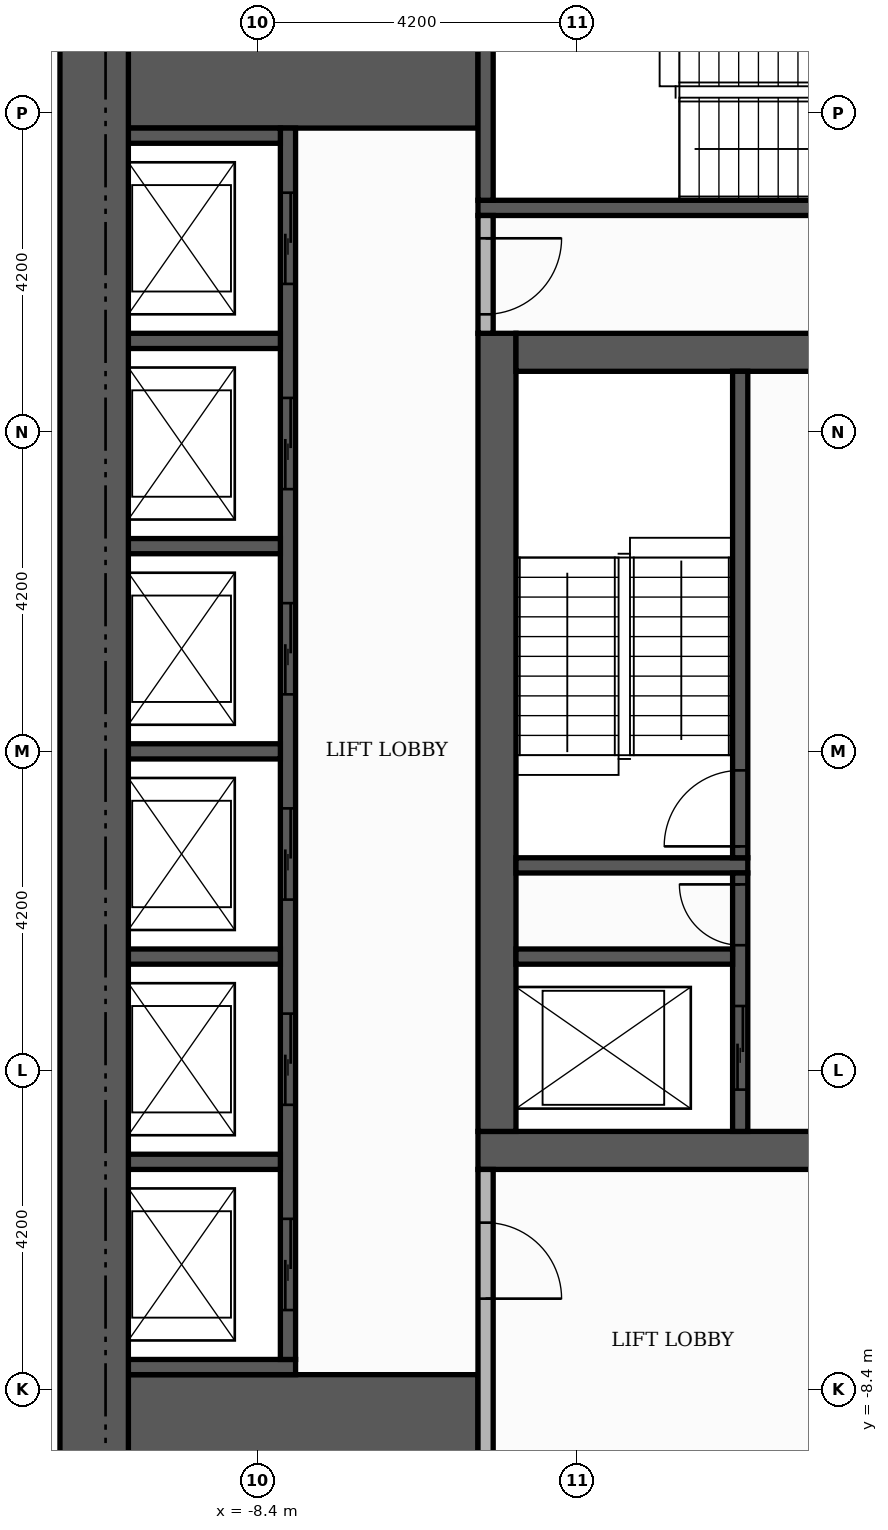
"""IFC4 building model, lengths in metres.
Left out: names, types, materials, properties, quantities, classifications, styles, units other than length and angle.
Written with IfcOpenShell. Run it as: python <this file> out.ifc"""

import sys

from ifc_helpers import new_model, si_unit, direction, frame, frame_2d, origin, place, context, subcontext, project, spatial, rectangle, extrude, element, fill, save


model = new_model("IFC4")
c1 = context("Model", 3, precision=1e-05, world=origin(), true_north=direction((0.0, 1.0)))
c2 = subcontext(c1, "Body", "Model", "MODEL_VIEW")
j1 = project(units=[si_unit("LENGTHUNIT", "METRE"), si_unit("PLANEANGLEUNIT", "RADIAN")], contexts=[c1])
p1 = place(None, origin())
s1 = spatial("IfcSite", under=j1, at=p1, CompositionType="ELEMENT")
p2 = place(p1, origin())
s2 = spatial("IfcBuilding", under=s1, at=p2, CompositionType="ELEMENT")
p3 = place(p2, frame((0.0, 0.0, 30.9)))
s3 = spatial("IfcBuildingStorey", under=s2, at=p3, CompositionType="ELEMENT", Elevation=30.9)
p4 = place(p3, frame((-5.5, -5.25, 0.0), z_axis=(0.0, 0.0, 1.0), x_axis=(1.0, 0.0, 0.0)))
e1 = element("IfcWall", 1, at=p4, inside=s3, PredefinedType="SHEAR", context=c2, shape_type="SweptSolid", body=[
    extrude(rectangle(XDim=11.0, YDim=0.5, at=frame_2d((5.5, 0.0))), origin(), (0.0, 0.0, 1.0), 3.48),
])
p5 = place(p4, frame((4.9, 0.0, 0.0)))
e2 = element("IfcOpeningElement", 2, at=p5, cuts=e1, PredefinedType="OPENING", context=c2, shape_type="SweptSolid", body=[
    extrude(rectangle(XDim=1.2, YDim=2.1, at=frame_2d((0.6, 1.05))), frame((0.0, 0.26, 0.0), z_axis=(0.0, -1.0, 0.0), x_axis=(1.0, 0.0, 0.0)), (0.0, 0.0, 1.0), 0.52),
])
p6 = place(p3, frame((-5.25, -5.0, 0.0), z_axis=(0.0, 0.0, 1.0), x_axis=(0.0, 1.0, 0.0)))
e3 = element("IfcWall", 3, at=p6, inside=s3, PredefinedType="SHEAR", context=c2, shape_type="SweptSolid", body=[
    extrude(rectangle(XDim=10.5, YDim=0.5, at=frame_2d((5.25, 0.0))), origin(), (0.0, 0.0, 1.0), 3.48),
])
p7 = place(p3, frame((-5.0, 5.25, 0.0), z_axis=(0.0, 0.0, 1.0), x_axis=(1.0, 0.0, 0.0)))
e4 = element("IfcWall", 4, at=p7, inside=s3, PredefinedType="SHEAR", context=c2, shape_type="SweptSolid", body=[
    extrude(rectangle(XDim=10.0, YDim=0.5, at=frame_2d((5.0, 0.0))), origin(), (0.0, 0.0, 1.0), 3.48),
])
p8 = place(p7, frame((4.4, 0.0, 0.0)))
e5 = element("IfcOpeningElement", 5, at=p8, cuts=e4, PredefinedType="OPENING", context=c2, shape_type="SweptSolid", body=[
    extrude(rectangle(XDim=1.2, YDim=2.1, at=frame_2d((0.6, 1.05))), frame((0.0, 0.26, 0.0), z_axis=(0.0, -1.0, 0.0), x_axis=(1.0, 0.0, 0.0)), (0.0, 0.0, 1.0), 0.52),
])
for number, where, z_axis, x_axis in (
    (6, (-10.1, -9.15, 0.0), (0.0, 0.0, 1.0), (1.0, 0.0, 0.0)),
    (7, (-10.1, 9.15, 0.0), (0.0, 0.0, 1.0), (1.0, 0.0, 0.0)),
):
    element("IfcWall", number, at=place(p3, frame(where, z_axis=z_axis, x_axis=x_axis)), inside=s3, PredefinedType="SHEAR", context=c2, shape_type="SweptSolid", body=[
        extrude(rectangle(XDim=4.6, YDim=1.9, at=frame_2d((2.3, 0.0))), origin(), (0.0, 0.0, 1.0), 3.48),
    ])
p9 = place(p3, frame((-5.0, -1.5, 0.0), z_axis=(0.0, 0.0, 1.0), x_axis=(1.0, 0.0, 0.0)))
e8 = element("IfcWall", 8, at=p9, inside=s3, PredefinedType="SHEAR", context=c2, shape_type="SweptSolid", body=[
    extrude(rectangle(XDim=3.05, YDim=0.2, at=frame_2d((1.525, 0.0))), origin(), (0.0, 0.0, 1.0), 3.48),
])
p10 = place(p3, frame((-2.05, -1.4, 0.0), z_axis=(0.0, 0.0, 1.0), x_axis=(0.0, 1.0, 0.0)))
e9 = element("IfcWall", 9, at=p10, inside=s3, PredefinedType="SHEAR", context=c2, shape_type="SweptSolid", body=[
    extrude(rectangle(XDim=6.4, YDim=0.2, at=frame_2d((3.2, 0.0))), origin(), (0.0, 0.0, 1.0), 3.48),
])
p11 = place(p10, frame((0.15, 0.0, 0.0)))
e10 = element("IfcOpeningElement", 10, at=p11, cuts=e9, PredefinedType="OPENING", context=c2, shape_type="SweptSolid", body=[
    extrude(rectangle(XDim=1.0, YDim=2.1, at=frame_2d((0.5, 1.05))), frame((0.0, 0.11, 0.0), z_axis=(0.0, -1.0, 0.0), x_axis=(1.0, 0.0, 0.0)), (0.0, 0.0, 1.0), 0.22),
])
p12 = place(p3, frame((-5.5, 7.15, 0.0), z_axis=(0.0, 0.0, 1.0), x_axis=(1.0, 0.0, 0.0)))
e11 = element("IfcWall", 11, at=p12, inside=s3, PredefinedType="SHEAR", context=c2, shape_type="SweptSolid", body=[
    extrude(rectangle(XDim=6.8, YDim=0.2, at=frame_2d((3.4, 0.0))), origin(), (0.0, 0.0, 1.0), 3.48),
])
p13 = place(p3, frame((-5.4, 7.25, 0.0), z_axis=(0.0, 0.0, 1.0), x_axis=(0.0, 1.0, 0.0)))
e12 = element("IfcWall", 12, at=p13, inside=s3, PredefinedType="SHEAR", context=c2, shape_type="SweptSolid", body=[
    extrude(rectangle(XDim=2.85, YDim=0.2, at=frame_2d((1.425, 0.0))), origin(), (0.0, 0.0, 1.0), 3.48),
])
p14 = place(p3, frame((-10.1, -8.1, 0.0), z_axis=(0.0, 0.0, 1.0), x_axis=(1.0, 0.0, 0.0)))
e13 = element("IfcWall", 13, at=p14, inside=s3, PredefinedType="SHEAR", context=c2, shape_type="SweptSolid", body=[
    extrude(rectangle(XDim=2.2, YDim=0.2, at=frame_2d((1.1, 0.0))), origin(), (0.0, 0.0, 1.0), 3.48),
])
p15 = place(p3, frame((-8.0, -8.0, 0.0), z_axis=(0.0, 0.0, 1.0), x_axis=(0.0, 1.0, 0.0)))
e14 = element("IfcWall", 14, at=p15, inside=s3, PredefinedType="SHEAR", context=c2, shape_type="SweptSolid", body=[
    extrude(rectangle(XDim=16.2, YDim=0.2, at=frame_2d((8.1, 0.0))), origin(), (0.0, 0.0, 1.0), 3.48),
])
p16 = place(p15, frame((0.65, 0.0, 0.0)))
e15 = element("IfcOpeningElement", 15, at=p16, cuts=e14, PredefinedType="OPENING", context=c2, shape_type="SweptSolid", body=[
    extrude(rectangle(XDim=1.2, YDim=2.1, at=frame_2d((0.6, 1.05))), frame((0.0, 0.11, 0.0), z_axis=(0.0, -1.0, 0.0), x_axis=(1.0, 0.0, 0.0)), (0.0, 0.0, 1.0), 0.22),
])
p17 = place(p15, frame((3.35, 0.0, 0.0)))
e16 = element("IfcOpeningElement", 16, at=p17, cuts=e14, PredefinedType="OPENING", context=c2, shape_type="SweptSolid", body=[
    extrude(rectangle(XDim=1.2, YDim=2.1, at=frame_2d((0.6, 1.05))), frame((0.0, 0.11, 0.0), z_axis=(0.0, -1.0, 0.0), x_axis=(1.0, 0.0, 0.0)), (0.0, 0.0, 1.0), 0.22),
])
p18 = place(p15, frame((6.05, 0.0, 0.0)))
e17 = element("IfcOpeningElement", 17, at=p18, cuts=e14, PredefinedType="OPENING", context=c2, shape_type="SweptSolid", body=[
    extrude(rectangle(XDim=1.2, YDim=2.1, at=frame_2d((0.6, 1.05))), frame((0.0, 0.11, 0.0), z_axis=(0.0, -1.0, 0.0), x_axis=(1.0, 0.0, 0.0)), (0.0, 0.0, 1.0), 0.22),
])
p19 = place(p15, frame((8.75, 0.0, 0.0)))
e18 = element("IfcOpeningElement", 18, at=p19, cuts=e14, PredefinedType="OPENING", context=c2, shape_type="SweptSolid", body=[
    extrude(rectangle(XDim=1.2, YDim=2.1, at=frame_2d((0.6, 1.05))), frame((0.0, 0.11, 0.0), z_axis=(0.0, -1.0, 0.0), x_axis=(1.0, 0.0, 0.0)), (0.0, 0.0, 1.0), 0.22),
])
p20 = place(p15, frame((11.45, 0.0, 0.0)))
e19 = element("IfcOpeningElement", 19, at=p20, cuts=e14, PredefinedType="OPENING", context=c2, shape_type="SweptSolid", body=[
    extrude(rectangle(XDim=1.2, YDim=2.1, at=frame_2d((0.6, 1.05))), frame((0.0, 0.11, 0.0), z_axis=(0.0, -1.0, 0.0), x_axis=(1.0, 0.0, 0.0)), (0.0, 0.0, 1.0), 0.22),
])
p21 = place(p15, frame((14.15, 0.0, 0.0)))
e20 = element("IfcOpeningElement", 20, at=p21, cuts=e14, PredefinedType="OPENING", context=c2, shape_type="SweptSolid", body=[
    extrude(rectangle(XDim=1.2, YDim=2.1, at=frame_2d((0.6, 1.05))), frame((0.0, 0.11, 0.0), z_axis=(0.0, -1.0, 0.0), x_axis=(1.0, 0.0, 0.0)), (0.0, 0.0, 1.0), 0.22),
])
p22 = place(p3, frame((-10.1, -5.4, 0.0), z_axis=(0.0, 0.0, 1.0), x_axis=(1.0, 0.0, 0.0)))
e21 = element("IfcWall", 21, at=p22, inside=s3, PredefinedType="SHEAR", context=c2, shape_type="SweptSolid", body=[
    extrude(rectangle(XDim=2.0, YDim=0.2, at=frame_2d((1.0, 0.0))), origin(), (0.0, 0.0, 1.0), 3.48),
])
p23 = place(p3, frame((-2.05, -5.0, 0.0), z_axis=(0.0, 0.0, 1.0), x_axis=(0.0, 1.0, 0.0)))
e22 = element("IfcWall", 22, at=p23, inside=s3, PredefinedType="SHEAR", context=c2, shape_type="SweptSolid", body=[
    extrude(rectangle(XDim=3.4, YDim=0.2, at=frame_2d((1.7, 0.0))), origin(), (0.0, 0.0, 1.0), 3.48),
])
p24 = place(p23, frame((0.55, 0.0, 0.0)))
e23 = element("IfcOpeningElement", 23, at=p24, cuts=e22, PredefinedType="OPENING", context=c2, shape_type="SweptSolid", body=[
    extrude(rectangle(XDim=1.1, YDim=2.1, at=frame_2d((0.55, 1.05))), frame((0.0, 0.11, 0.0), z_axis=(0.0, -1.0, 0.0), x_axis=(1.0, 0.0, 0.0)), (0.0, 0.0, 1.0), 0.22),
])
p25 = place(p23, frame((2.45, 0.0, 0.0)))
e24 = element("IfcOpeningElement", 24, at=p25, cuts=e22, PredefinedType="OPENING", context=c2, shape_type="SweptSolid", body=[
    extrude(rectangle(XDim=0.8, YDim=2.1, at=frame_2d((0.4, 1.05))), frame((0.0, 0.11, 0.0), z_axis=(0.0, -1.0, 0.0), x_axis=(1.0, 0.0, 0.0)), (0.0, 0.0, 1.0), 0.22),
])
p26 = place(p3, frame((-10.1, -2.7, 0.0), z_axis=(0.0, 0.0, 1.0), x_axis=(1.0, 0.0, 0.0)))
e25 = element("IfcWall", 25, at=p26, inside=s3, PredefinedType="SHEAR", context=c2, shape_type="SweptSolid", body=[
    extrude(rectangle(XDim=2.0, YDim=0.2, at=frame_2d((1.0, 0.0))), origin(), (0.0, 0.0, 1.0), 3.48),
])
p27 = place(p3, frame((-5.0, -2.7, 0.0), z_axis=(0.0, 0.0, 1.0), x_axis=(1.0, 0.0, 0.0)))
e26 = element("IfcWall", 26, at=p27, inside=s3, PredefinedType="SHEAR", context=c2, shape_type="SweptSolid", body=[
    extrude(rectangle(XDim=2.85, YDim=0.2, at=frame_2d((1.425, 0.0))), origin(), (0.0, 0.0, 1.0), 3.48),
])
for number, where, z_axis, x_axis in (
    (27, (-10.1, 0.0, 0.0), (0.0, 0.0, 1.0), (1.0, 0.0, 0.0)),
    (28, (-10.1, 2.7, 0.0), (0.0, 0.0, 1.0), (1.0, 0.0, 0.0)),
    (29, (-10.1, 5.4, 0.0), (0.0, 0.0, 1.0), (1.0, 0.0, 0.0)),
    (30, (-10.1, 8.1, 0.0), (0.0, 0.0, 1.0), (1.0, 0.0, 0.0)),
):
    element("IfcWall", number, at=place(p3, frame(where, z_axis=z_axis, x_axis=x_axis)), inside=s3, PredefinedType="SHEAR", context=c2, shape_type="SweptSolid", body=[
        extrude(rectangle(XDim=2.0, YDim=0.2, at=frame_2d((1.0, 0.0))), origin(), (0.0, 0.0, 1.0), 3.48),
    ])
p28 = place(p3, frame((-10.55, -10.1, 0.0), z_axis=(0.0, 0.0, 1.0), x_axis=(0.0, 1.0, 0.0)))
e31 = element("IfcWall", 31, at=p28, inside=s3, PredefinedType="SHEAR", context=c2, shape_type="SweptSolid", body=[
    extrude(rectangle(XDim=20.2, YDim=0.9, at=frame_2d((10.1, 0.0))), origin(), (0.0, 0.0, 1.0), 3.48),
])
p29 = place(p3, frame((-5.4, -10.1, 0.0), z_axis=(0.0, 0.0, 1.0), x_axis=(0.0, 1.0, 0.0)))
e32 = element("IfcWall", 32, at=p29, inside=s3, PredefinedType="PARTITIONING", context=c2, shape_type="SweptSolid", body=[
    extrude(rectangle(XDim=4.6, YDim=0.2, at=frame_2d((2.3, 0.0))), origin(), (0.0, 0.0, 1.0), 3.48),
])
p30 = place(p29, frame((2.9, 0.0, 0.0)))
e33 = element("IfcOpeningElement", 33, at=p30, cuts=e32, PredefinedType="OPENING", context=c2, shape_type="SweptSolid", body=[
    extrude(rectangle(XDim=1.0, YDim=2.1, at=frame_2d((0.5, 1.05))), frame((0.0, 0.11, 0.0), z_axis=(0.0, -1.0, 0.0), x_axis=(1.0, 0.0, 0.0)), (0.0, 0.0, 1.0), 0.22),
])
p31 = place(p3, frame((-5.4, 5.5, 0.0), z_axis=(0.0, 0.0, 1.0), x_axis=(0.0, 1.0, 0.0)))
e34 = element("IfcWall", 34, at=p31, inside=s3, PredefinedType="PARTITIONING", context=c2, shape_type="SweptSolid", body=[
    extrude(rectangle(XDim=1.55, YDim=0.2, at=frame_2d((0.775, 0.0))), origin(), (0.0, 0.0, 1.0), 3.48),
])
p32 = place(p31, frame((0.25, 0.0, 0.0)))
e35 = element("IfcOpeningElement", 35, at=p32, cuts=e34, PredefinedType="OPENING", context=c2, shape_type="SweptSolid", body=[
    extrude(rectangle(XDim=1.0, YDim=2.1, at=frame_2d((0.5, 1.05))), frame((0.0, 0.11, 0.0), z_axis=(0.0, -1.0, 0.0), x_axis=(1.0, 0.0, 0.0)), (0.0, 0.0, 1.0), 0.22),
])
p33 = place(p16, origin())
e36 = element("IfcDoor", 36, at=p33, inside=s3, OperationType="SLIDING_TO_LEFT", PredefinedType="DOOR", context=c2, shape_type="SweptSolid", body=[
    extrude(rectangle(XDim=1.2, YDim=2.1, at=frame_2d((0.6, 1.05))), frame((0.0, 0.025, 0.0), z_axis=(0.0, -1.0, 0.0), x_axis=(1.0, 0.0, 0.0)), (0.0, 0.0, 1.0), 0.05),
])
fill(e15, e36)
p34 = place(p17, origin())
e37 = element("IfcDoor", 37, at=p34, inside=s3, OperationType="SLIDING_TO_LEFT", PredefinedType="DOOR", context=c2, shape_type="SweptSolid", body=[
    extrude(rectangle(XDim=1.2, YDim=2.1, at=frame_2d((0.6, 1.05))), frame((0.0, 0.025, 0.0), z_axis=(0.0, -1.0, 0.0), x_axis=(1.0, 0.0, 0.0)), (0.0, 0.0, 1.0), 0.05),
])
fill(e16, e37)
p35 = place(p18, origin())
e38 = element("IfcDoor", 38, at=p35, inside=s3, OperationType="SLIDING_TO_LEFT", PredefinedType="DOOR", context=c2, shape_type="SweptSolid", body=[
    extrude(rectangle(XDim=1.2, YDim=2.1, at=frame_2d((0.6, 1.05))), frame((0.0, 0.025, 0.0), z_axis=(0.0, -1.0, 0.0), x_axis=(1.0, 0.0, 0.0)), (0.0, 0.0, 1.0), 0.05),
])
fill(e17, e38)
p36 = place(p19, origin())
e39 = element("IfcDoor", 39, at=p36, inside=s3, OperationType="SLIDING_TO_LEFT", PredefinedType="DOOR", context=c2, shape_type="SweptSolid", body=[
    extrude(rectangle(XDim=1.2, YDim=2.1, at=frame_2d((0.6, 1.05))), frame((0.0, 0.025, 0.0), z_axis=(0.0, -1.0, 0.0), x_axis=(1.0, 0.0, 0.0)), (0.0, 0.0, 1.0), 0.05),
])
fill(e18, e39)
p37 = place(p20, origin())
e40 = element("IfcDoor", 40, at=p37, inside=s3, OperationType="SLIDING_TO_LEFT", PredefinedType="DOOR", context=c2, shape_type="SweptSolid", body=[
    extrude(rectangle(XDim=1.2, YDim=2.1, at=frame_2d((0.6, 1.05))), frame((0.0, 0.025, 0.0), z_axis=(0.0, -1.0, 0.0), x_axis=(1.0, 0.0, 0.0)), (0.0, 0.0, 1.0), 0.05),
])
fill(e19, e40)
p38 = place(p21, origin())
e41 = element("IfcDoor", 41, at=p38, inside=s3, OperationType="SLIDING_TO_LEFT", PredefinedType="DOOR", context=c2, shape_type="SweptSolid", body=[
    extrude(rectangle(XDim=1.2, YDim=2.1, at=frame_2d((0.6, 1.05))), frame((0.0, 0.025, 0.0), z_axis=(0.0, -1.0, 0.0), x_axis=(1.0, 0.0, 0.0)), (0.0, 0.0, 1.0), 0.05),
])
fill(e20, e41)
p39 = place(p24, origin())
e42 = element("IfcDoor", 42, at=p39, inside=s3, OperationType="SLIDING_TO_LEFT", PredefinedType="DOOR", context=c2, shape_type="SweptSolid", body=[
    extrude(rectangle(XDim=1.1, YDim=2.1, at=frame_2d((0.55, 1.05))), frame((0.0, 0.025, 0.0), z_axis=(0.0, -1.0, 0.0), x_axis=(1.0, 0.0, 0.0)), (0.0, 0.0, 1.0), 0.05),
])
fill(e23, e42)
p40 = place(p11, origin())
e43 = element("IfcDoor", 43, at=p40, inside=s3, OperationType="SINGLE_SWING_LEFT", PredefinedType="DOOR", context=c2, shape_type="SweptSolid", body=[
    extrude(rectangle(XDim=1.0, YDim=2.1, at=frame_2d((0.5, 1.05))), frame((0.0, 0.025, 0.0), z_axis=(0.0, -1.0, 0.0), x_axis=(1.0, 0.0, 0.0)), (0.0, 0.0, 1.0), 0.05),
])
fill(e10, e43)
p41 = place(p25, origin())
e44 = element("IfcDoor", 44, at=p41, inside=s3, OperationType="SINGLE_SWING_RIGHT", PredefinedType="DOOR", context=c2, shape_type="SweptSolid", body=[
    extrude(rectangle(XDim=0.8, YDim=2.1, at=frame_2d((0.4, 1.05))), frame((0.0, 0.025, 0.0), z_axis=(0.0, -1.0, 0.0), x_axis=(1.0, 0.0, 0.0)), (0.0, 0.0, 1.0), 0.05),
])
fill(e24, e44)
p42 = place(p32, frame((1.0, 0.0, 0.0), z_axis=(0.0, 0.0, 1.0), x_axis=(-1.0, 0.0, 0.0)))
e45 = element("IfcDoor", 45, at=p42, inside=s3, OperationType="SINGLE_SWING_RIGHT", PredefinedType="DOOR", context=c2, shape_type="SweptSolid", body=[
    extrude(rectangle(XDim=1.0, YDim=2.1, at=frame_2d((0.5, 1.05))), frame((0.0, 0.025, 0.0), z_axis=(0.0, -1.0, 0.0), x_axis=(1.0, 0.0, 0.0)), (0.0, 0.0, 1.0), 0.05),
])
fill(e35, e45)
p43 = place(p30, frame((1.0, 0.0, 0.0), z_axis=(0.0, 0.0, 1.0), x_axis=(-1.0, 0.0, 0.0)))
e46 = element("IfcDoor", 46, at=p43, inside=s3, OperationType="SINGLE_SWING_LEFT", PredefinedType="DOOR", context=c2, shape_type="SweptSolid", body=[
    extrude(rectangle(XDim=1.0, YDim=2.1, at=frame_2d((0.5, 1.05))), frame((0.0, 0.025, 0.0), z_axis=(0.0, -1.0, 0.0), x_axis=(1.0, 0.0, 0.0)), (0.0, 0.0, 1.0), 0.05),
])
fill(e33, e46)
save(model, sys.argv[1])
